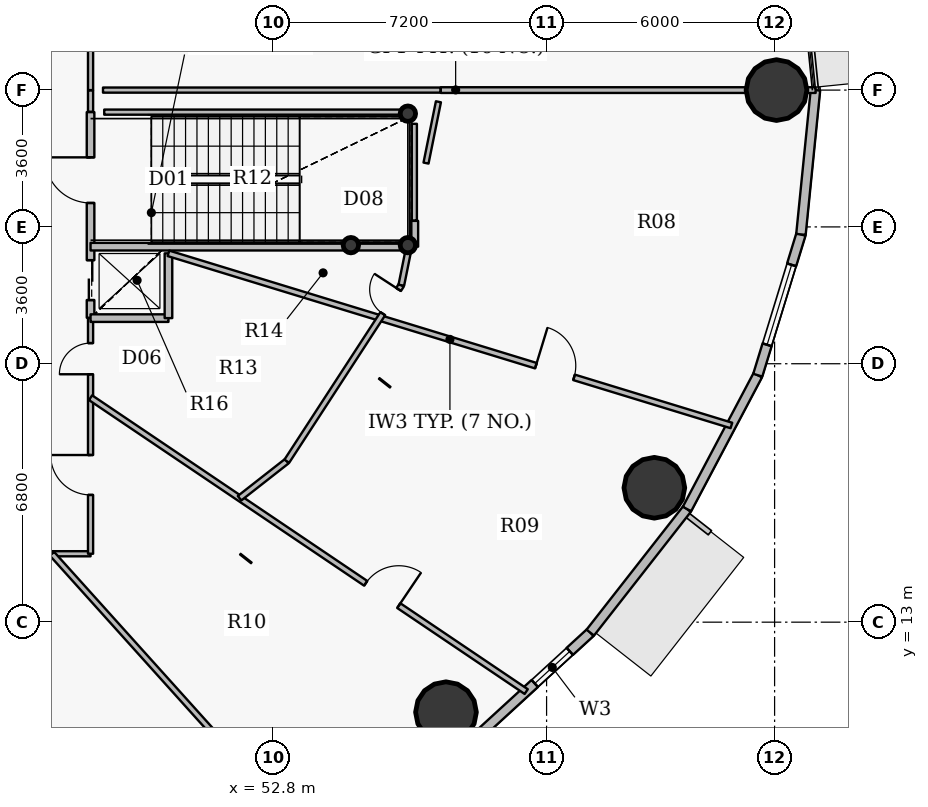
"""IFC4 building model, lengths in metres.
Left out: names, types, materials, properties, quantities, classifications, styles, units other than length and angle.
Written with IfcOpenShell. Run it as: python <this file> out.ifc"""

import sys

from ifc_helpers import new_model, si_unit, direction, frame, frame_2d, origin, origin_2d, place, context, subcontext, project, spatial, rectangle, hollow_circle, extrude, source, transform, mapped, element, fill, save


model = new_model("IFC4")
c1 = context("Model", 3, precision=1e-05, world=origin(), true_north=direction((0.0, 1.0)))
c2 = subcontext(c1, "Body", "Model", "MODEL_VIEW")
j1 = project(units=[si_unit("LENGTHUNIT", "METRE"), si_unit("PLANEANGLEUNIT", "RADIAN")], contexts=[c1])
p1 = place(None, origin())
s1 = spatial("IfcSite", under=j1, at=p1, CompositionType="ELEMENT")
p2 = place(p1, origin())
s2 = spatial("IfcBuilding", under=s1, at=p2, CompositionType="ELEMENT")
p3 = place(p2, frame((0.0, 0.0, 49.2)))
s3 = spatial("IfcBuildingStorey", under=s2, at=p3, CompositionType="ELEMENT", Elevation=49.2)
for number, where, z_axis, x_axis in (
    (1, (56.35, 26.38, 0.0), (0.0, 0.0, 1.0), (1.0, 0.0, 0.0)),
    (2, (56.35, 22.92, 0.0), (0.0, 0.0, 1.0), (1.0, 0.0, 0.0)),
    (3, (54.85, 22.92, 0.0), (0.0, 0.0, 1.0), (1.0, 0.0, 0.0)),
):
    element("IfcColumn", number, at=place(p3, frame(where, z_axis=z_axis, x_axis=x_axis)), inside=s3, PredefinedType="COLUMN", context=c2, shape_type="SweptSolid", body=[
        extrude(hollow_circle(Radius=0.203, WallThickness=0.016, at=origin_2d()), origin(), (0.0, 0.0, 1.0), 4.2),
    ])
for number, where, z_axis, x_axis in (
    (4, (66.05, 27.0, 0.0), (0.0, 0.0, 1.0), (1.0, 0.0, 0.0)),
    (5, (57.353, 10.631, 0.0), (0.0, 0.0, 1.0), (1.0, 0.0, 0.0)),
    (6, (62.835, 16.536, 0.0), (0.0, 0.0, 1.0), (1.0, 0.0, 0.0)),
):
    element("IfcColumn", number, at=place(p3, frame(where, z_axis=z_axis, x_axis=x_axis)), inside=s3, PredefinedType="COLUMN", context=c2, shape_type="SweptSolid", body=[
        extrude(hollow_circle(Radius=0.8, WallThickness=0.045, at=origin_2d()), origin(), (0.0, 0.0, 1.0), 4.2),
    ])
p4 = place(p3, frame((61.15, 12.725, 0.0), z_axis=(0.0, 0.0, 1.0), x_axis=(-0.737116376281, -0.67576582321, 0.0)))
e7 = element("IfcWall", 7, at=p4, inside=s3, PredefinedType="SOLIDWALL", context=c2, shape_type="SweptSolid", body=[
    extrude(rectangle(XDim=4.294, YDim=0.25, at=frame_2d((2.147, 0.0))), origin(), (0.0, 0.0, 1.0), 3.95),
])
p5 = place(p4, frame((0.731, 0.0, 0.9)))
e8 = element("IfcOpeningElement", 8, at=p5, cuts=e7, PredefinedType="OPENING", context=c2, shape_type="SweptSolid", body=[
    extrude(rectangle(XDim=1.25, YDim=1.65, at=origin_2d()), frame((0.625, 0.135, 0.825), z_axis=(0.0, -1.0, 0.0), x_axis=(1.0, 0.0, 0.0)), (0.0, 0.0, 1.0), 0.27),
])
p6 = place(p3, frame((63.695, 15.977, 0.0), z_axis=(0.0, 0.0, 1.0), x_axis=(-0.616295508253, -0.787514981767, 0.0)))
e9 = element("IfcWall", 9, at=p6, inside=s3, PredefinedType="SOLIDWALL", context=c2, shape_type="SweptSolid", body=[
    extrude(rectangle(XDim=4.129, YDim=0.25, at=frame_2d((2.065, 0.0))), origin(), (0.0, 0.0, 1.0), 3.95),
])
p7 = place(p3, frame((65.558, 19.499, 0.0), z_axis=(0.0, 0.0, 1.0), x_axis=(-0.467662443071, -0.883907144072, 0.0)))
e10 = element("IfcWall", 10, at=p7, inside=s3, PredefinedType="SOLIDWALL", context=c2, shape_type="SweptSolid", body=[
    extrude(rectangle(XDim=3.984, YDim=0.25, at=frame_2d((1.992, 0.0))), origin(), (0.0, 0.0, 1.0), 3.95),
])
p8 = place(p3, frame((66.693, 23.203, 0.0), z_axis=(0.0, 0.0, 1.0), x_axis=(-0.293111631758, -0.956078224482, 0.0)))
e11 = element("IfcWall", 11, at=p8, inside=s3, PredefinedType="SOLIDWALL", context=c2, shape_type="SweptSolid", body=[
    extrude(rectangle(XDim=3.875, YDim=0.25, at=frame_2d((1.938, 0.0))), origin(), (0.0, 0.0, 1.0), 3.95),
])
p9 = place(p8, frame((0.837, 0.0, 0.9)))
e12 = element("IfcOpeningElement", 12, at=p9, cuts=e11, PredefinedType="OPENING", context=c2, shape_type="SweptSolid", body=[
    extrude(rectangle(XDim=2.2, YDim=2.0, at=origin_2d()), frame((1.1, 0.135, 1.0), z_axis=(0.0, -1.0, 0.0), x_axis=(1.0, 0.0, 0.0)), (0.0, 0.0, 1.0), 0.27),
])
p10 = place(p3, frame((67.075, 27.0, 0.0), z_axis=(0.0, 0.0, 1.0), x_axis=(-0.099997795174, -0.994987658698, 0.0)))
e13 = element("IfcWall", 13, at=p10, inside=s3, PredefinedType="SOLIDWALL", context=c2, shape_type="SweptSolid", body=[
    extrude(rectangle(XDim=3.816, YDim=0.25, at=frame_2d((1.908, 0.0))), origin(), (0.0, 0.0, 1.0), 3.95),
])
p11 = place(p3, frame((46.05, 14.8, 0.0), z_axis=(0.0, 0.0, 1.0), x_axis=(1.0, 0.0, 0.0)))
e14 = element("IfcWall", 14, at=p11, inside=s3, PredefinedType="PARTITIONING", context=c2, shape_type="SweptSolid", body=[
    extrude(rectangle(XDim=1.95, YDim=0.135, at=frame_2d((0.975, 0.0))), origin(), (0.0, 0.0, 1.0), 3.95),
])
p12 = place(p3, frame((46.985, 14.8, 0.0), z_axis=(0.0, 0.0, 1.0), x_axis=(0.669133664768, -0.743142071662, 0.0)))
e15 = element("IfcWall", 15, at=p12, inside=s3, PredefinedType="PARTITIONING", context=c2, shape_type="SweptSolid", body=[
    extrude(rectangle(XDim=10.299, YDim=0.15, at=frame_2d((5.149, 0.0))), origin(), (0.0, 0.0, 1.0), 3.335),
])
p13 = place(p3, frame((48.0, 14.8, 0.0), z_axis=(0.0, 0.0, 1.0), x_axis=(0.0, 1.0, 0.0)))
e16 = element("IfcWall", 16, at=p13, inside=s3, PredefinedType="PARTITIONING", context=c2, shape_type="SweptSolid", body=[
    extrude(rectangle(XDim=6.2, YDim=0.135, at=frame_2d((3.1, 0.0))), origin(), (0.0, 0.0, 1.0), 3.285),
])
p14 = place(p13, frame((1.548, 0.0, 0.0)))
e17 = element("IfcOpeningElement", 17, at=p14, cuts=e16, PredefinedType="OPENING", context=c2, shape_type="SweptSolid", body=[
    extrude(rectangle(XDim=1.05, YDim=2.15, at=origin_2d()), frame((0.525, 0.078, 1.075), z_axis=(0.0, -1.0, 0.0), x_axis=(1.0, 0.0, 0.0)), (0.0, 0.0, 1.0), 0.155),
])
p15 = place(p13, frame((4.723, 0.0, 0.0)))
e18 = element("IfcOpeningElement", 18, at=p15, cuts=e16, PredefinedType="OPENING", context=c2, shape_type="SweptSolid", body=[
    extrude(rectangle(XDim=0.82, YDim=2.1, at=origin_2d()), frame((0.41, 0.078, 1.05), z_axis=(0.0, -1.0, 0.0), x_axis=(1.0, 0.0, 0.0)), (0.0, 0.0, 1.0), 0.155),
])
p16 = place(p3, frame((48.0, 18.906, 0.0), z_axis=(0.0, 0.0, 1.0), x_axis=(0.829036724814, -0.559194160296, 0.0)))
e19 = element("IfcWall", 19, at=p16, inside=s3, PredefinedType="PARTITIONING", context=c2, shape_type="SweptSolid", body=[
    extrude(rectangle(XDim=13.828, YDim=0.15, at=frame_2d((6.914, 0.0))), origin(), (0.0, 0.0, 1.0), 3.335),
])
p17 = place(p16, frame((8.733, 0.0, 0.0)))
e20 = element("IfcOpeningElement", 20, at=p17, cuts=e19, PredefinedType="OPENING", context=c2, shape_type="SweptSolid", body=[
    extrude(rectangle(XDim=1.05, YDim=2.15, at=origin_2d()), frame((0.525, 0.085, 1.075), z_axis=(0.0, -1.0, 0.0), x_axis=(1.0, 0.0, 0.0)), (0.0, 0.0, 1.0), 0.17),
])
p18 = place(p3, frame((48.0, 21.01, 0.0), z_axis=(0.0, 0.0, 1.0), x_axis=(0.0, 1.0, 0.0)))
e21 = element("IfcWall", 21, at=p18, inside=s3, PredefinedType="PARTITIONING", context=c2, shape_type="SweptSolid", body=[
    extrude(rectangle(XDim=5.41, YDim=0.2, at=frame_2d((2.705, 0.0))), origin(), (0.0, 0.0, 1.0), 3.285),
])
p19 = place(p18, frame((3.02, 0.0, 0.0)))
e22 = element("IfcOpeningElement", 22, at=p19, cuts=e21, PredefinedType="OPENING", context=c2, shape_type="SweptSolid", body=[
    extrude(rectangle(XDim=1.2, YDim=2.15, at=origin_2d()), frame((0.6, 0.11, 1.075), z_axis=(0.0, -1.0, 0.0), x_axis=(1.0, 0.0, 0.0)), (0.0, 0.0, 1.0), 0.22),
])
p20 = place(p18, frame((0.465, 0.0, 0.0)))
e23 = element("IfcOpeningElement", 23, at=p20, cuts=e21, PredefinedType="OPENING", context=c2, shape_type="SweptSolid", body=[
    extrude(rectangle(XDim=1.05, YDim=2.15, at=origin_2d()), frame((0.525, 0.11, 1.075), z_axis=(0.0, -1.0, 0.0), x_axis=(1.0, 0.0, 0.0)), (0.0, 0.0, 1.0), 0.22),
])
p21 = place(p3, frame((48.0, 21.0, 0.0), z_axis=(0.0, 0.0, 1.0), x_axis=(1.0, 0.0, 0.0)))
e24 = element("IfcWall", 24, at=p21, inside=s3, PredefinedType="PARTITIONING", context=c2, shape_type="SweptSolid", body=[
    extrude(rectangle(XDim=2.05, YDim=0.2, at=frame_2d((1.025, 0.0))), origin(), (0.0, 0.0, 1.0), 3.95),
])
p22 = place(p3, frame((48.0, 22.88, 0.0), z_axis=(0.0, 0.0, 1.0), x_axis=(1.0, 0.0, 0.0)))
e25 = element("IfcWall", 25, at=p22, inside=s3, PredefinedType="PARTITIONING", context=c2, shape_type="SweptSolid", body=[
    extrude(rectangle(XDim=8.383, YDim=0.2, at=frame_2d((4.191, 0.0))), origin(), (0.0, 0.0, 1.0), 3.95),
])
p23 = place(p3, frame((48.0, 27.0, 0.0), z_axis=(0.0, 0.0, 1.0), x_axis=(0.0, 1.0, 0.0)))
e26 = element("IfcWall", 26, at=p23, inside=s3, PredefinedType="PARTITIONING", context=c2, shape_type="SweptSolid", body=[
    extrude(rectangle(XDim=14.2, YDim=0.135, at=frame_2d((7.1, 0.0))), origin(), (0.0, 0.0, 1.0), 3.285),
])
p24 = place(p23, frame((2.959, 0.0, 0.0)))
e27 = element("IfcOpeningElement", 27, at=p24, cuts=e26, PredefinedType="OPENING", context=c2, shape_type="SweptSolid", body=[
    extrude(rectangle(XDim=1.05, YDim=2.15, at=origin_2d()), frame((0.525, 0.078, 1.075), z_axis=(0.0, -1.0, 0.0), x_axis=(1.0, 0.0, 0.0)), (0.0, 0.0, 1.0), 0.155),
])
p25 = place(p23, frame((10.019, 0.0, 0.0)))
e28 = element("IfcOpeningElement", 28, at=p25, cuts=e26, PredefinedType="OPENING", context=c2, shape_type="SweptSolid", body=[
    extrude(rectangle(XDim=1.05, YDim=2.15, at=origin_2d()), frame((0.525, 0.078, 1.075), z_axis=(0.0, -1.0, 0.0), x_axis=(1.0, 0.0, 0.0)), (0.0, 0.0, 1.0), 0.155),
])
p26 = place(p3, frame((50.05, 21.0, 0.0), z_axis=(0.0, 0.0, 1.0), x_axis=(0.0, 1.0, 0.0)))
e29 = element("IfcWall", 29, at=p26, inside=s3, PredefinedType="PARTITIONING", context=c2, shape_type="SweptSolid", body=[
    extrude(rectangle(XDim=1.705, YDim=0.2, at=frame_2d((0.852, 0.0))), origin(), (0.0, 0.0, 1.0), 3.285),
])
p27 = place(p3, frame((50.05, 22.705, 0.0), z_axis=(0.0, 0.0, 1.0), x_axis=(0.9563012706, -0.292383104588, 0.0)))
e30 = element("IfcWall", 30, at=p27, inside=s3, PredefinedType="PARTITIONING", context=c2, shape_type="SweptSolid", body=[
    extrude(rectangle(XDim=15.49, YDim=0.15, at=frame_2d((7.745, 0.0))), origin(), (0.0, 0.0, 1.0), 3.335),
])
p28 = place(p27, frame((10.11, 0.0, 0.0)))
e31 = element("IfcOpeningElement", 31, at=p28, cuts=e30, PredefinedType="OPENING", context=c2, shape_type="SweptSolid", body=[
    extrude(rectangle(XDim=1.05, YDim=2.15, at=origin_2d()), frame((0.525, 0.085, 1.075), z_axis=(0.0, -1.0, 0.0), x_axis=(1.0, 0.0, 0.0)), (0.0, 0.0, 1.0), 0.17),
])
p29 = place(p3, frame((51.92, 16.262, 0.0), z_axis=(0.0, 0.0, 1.0), x_axis=(0.787325584525, 0.616537447324, 0.0)))
e32 = element("IfcWall", 32, at=p29, inside=s3, PredefinedType="PARTITIONING", context=c2, shape_type="SweptSolid", body=[
    extrude(rectangle(XDim=1.58, YDim=0.15, at=frame_2d((0.79, 0.0))), origin(), (0.0, 0.0, 1.0), 3.95),
])
p30 = place(p3, frame((53.164, 17.236, 0.0), z_axis=(0.0, 0.0, 1.0), x_axis=(0.545448002944, 0.838144662981, 0.0)))
e33 = element("IfcWall", 33, at=p30, inside=s3, PredefinedType="PARTITIONING", context=c2, shape_type="SweptSolid", body=[
    extrude(rectangle(XDim=5.525, YDim=0.15, at=frame_2d((2.763, 0.0))), origin(), (0.0, 0.0, 1.0), 3.285),
])
p31 = place(p30, frame((4.631, 0.0, 0.0)))
e34 = element("IfcOpeningElement", 34, at=p31, cuts=e33, PredefinedType="OPENING", context=c2, shape_type="SweptSolid", body=[
    extrude(rectangle(XDim=0.76, YDim=2.1, at=origin_2d()), frame((0.38, 0.085, 1.05), z_axis=(0.0, -1.0, 0.0), x_axis=(1.0, 0.0, 0.0)), (0.0, 0.0, 1.0), 0.17),
])
p32 = place(p3, frame((56.178, 21.866, 0.0), z_axis=(0.0, 0.0, 1.0), x_axis=(0.198113758035, 0.980179034094, 0.0)))
e35 = element("IfcWall", 35, at=p32, inside=s3, PredefinedType="PARTITIONING", context=c2, shape_type="SweptSolid", body=[
    extrude(rectangle(XDim=1.034, YDim=0.15, at=frame_2d((0.517, 0.0))), origin(), (0.0, 0.0, 1.0), 3.95),
])
p33 = place(p3, frame((56.52, 22.88, 0.0), z_axis=(0.0, 0.0, 1.0), x_axis=(0.0, 1.0, 0.0)))
e36 = element("IfcWall", 36, at=p33, inside=s3, PredefinedType="PARTITIONING", context=c2, shape_type="SweptSolid", body=[
    extrude(rectangle(XDim=0.679, YDim=0.2, at=frame_2d((0.34, 0.0))), origin(), (0.0, 0.0, 1.0), 3.95),
])
p34 = place(p3, frame((57.216, 27.0, 0.0), z_axis=(0.0, 0.0, 1.0), x_axis=(1.0, 0.0, 0.0)))
e37 = element("IfcWall", 37, at=p34, inside=s3, PredefinedType="PARTITIONING", context=c2, shape_type="SweptSolid", body=[
    extrude(rectangle(XDim=9.864, YDim=0.15, at=frame_2d((4.932, 0.0))), origin(), (0.0, 0.0, 1.0), 3.285),
])
p35 = place(p3, frame((48.36, 26.42, 0.0), z_axis=(0.0, 0.0, 1.0), x_axis=(1.0, 0.0, 0.0)))
e38 = element("IfcWall", 38, at=p35, inside=s3, PredefinedType="PARTITIONING", context=c2, shape_type="SweptSolid", body=[
    extrude(rectangle(XDim=8.16, YDim=0.135, at=frame_2d((4.08, 0.0))), origin(), (0.0, 0.0, 1.0), 3.95),
])
p36 = place(p3, frame((56.52, 26.113, 0.0), z_axis=(0.0, 0.0, 1.0), x_axis=(0.0, -1.0, 0.0)))
e39 = element("IfcWall", 39, at=p36, inside=s3, PredefinedType="PARTITIONING", context=c2, shape_type="SweptSolid", body=[
    extrude(rectangle(XDim=2.543, YDim=0.135, at=frame_2d((1.272, 0.0))), origin(), (0.0, 0.0, 1.0), 3.95),
])
p37 = place(p3, frame((48.0, 26.99, 0.0), z_axis=(0.0, 0.0, 1.0), x_axis=(0.0, -1.0, 0.0)))
e40 = element("IfcWall", 40, at=p37, inside=s3, PredefinedType="PARTITIONING", context=c2, shape_type="SweptSolid", body=[
    extrude(rectangle(XDim=0.56, YDim=0.135, at=frame_2d((0.28, 0.0))), origin(), (0.0, 0.0, 1.0), 3.285),
])
p38 = place(p3, frame((57.206, 27.0, 0.0), z_axis=(0.0, 0.0, 1.0), x_axis=(-1.0, 0.0, 0.0)))
e41 = element("IfcWall", 41, at=p38, inside=s3, PredefinedType="PARTITIONING", context=c2, shape_type="SweptSolid", body=[
    extrude(rectangle(XDim=8.879, YDim=0.135, at=frame_2d((4.439, 0.0))), origin(), (0.0, 0.0, 1.0), 3.285),
])
p39 = place(p3, frame((56.827, 25.079, 0.0), z_axis=(0.0, 0.0, 1.0), x_axis=(0.198340845342, 0.980133107832, 0.0)))
e42 = element("IfcWall", 42, at=p39, inside=s3, PredefinedType="PARTITIONING", context=c2, shape_type="SweptSolid", body=[
    extrude(rectangle(XDim=1.646, YDim=0.135, at=frame_2d((0.823, 0.0))), origin(), (0.0, 0.0, 1.0), 3.95),
])
m1 = source(origin(), c2, "Body", "SweptSolid", [
    extrude(rectangle(XDim=1.25, YDim=1.65, at=origin_2d()), frame((0.625, 0.03, 0.825), z_axis=(0.0, -1.0, 0.0), x_axis=(1.0, 0.0, 0.0)), (0.0, 0.0, 1.0), 0.06),
])
p40 = place(p5, origin())
e43 = element("IfcWindow", 43, at=p40, inside=s3, PartitioningType="SINGLE_PANEL", PredefinedType="WINDOW", context=c2, shape_type="MappedRepresentation", body=[
    mapped(m1, transform((0.0, 0.0, 0.0), x_axis=(1.0, 0.0, 0.0), y_axis=(0.0, 1.0, 0.0), z_axis=(0.0, 0.0, 1.0), scale=1.0)),
])
fill(e8, e43)
m2 = source(origin(), c2, "Body", "SweptSolid", [
    extrude(rectangle(XDim=2.2, YDim=2.0, at=origin_2d()), frame((1.1, 0.03, 1.0), z_axis=(0.0, -1.0, 0.0), x_axis=(1.0, 0.0, 0.0)), (0.0, 0.0, 1.0), 0.06),
])
p41 = place(p9, origin())
e44 = element("IfcWindow", 44, at=p41, inside=s3, PartitioningType="TRIPLE_PANEL_VERTICAL", PredefinedType="WINDOW", context=c2, shape_type="MappedRepresentation", body=[
    mapped(m2, transform((0.0, 0.0, 0.0), x_axis=(1.0, 0.0, 0.0), y_axis=(0.0, 1.0, 0.0), z_axis=(0.0, 0.0, 1.0), scale=1.0)),
])
fill(e12, e44)
m3 = source(origin(), c2, "Body", "SweptSolid", [
    extrude(rectangle(XDim=1.2, YDim=2.15, at=origin_2d()), frame((0.6, 0.025, 1.075), z_axis=(0.0, -1.0, 0.0), x_axis=(1.0, 0.0, 0.0)), (0.0, 0.0, 1.0), 0.05),
])
p42 = place(p19, origin())
e45 = element("IfcDoor", 45, at=p42, inside=s3, OperationType="SINGLE_SWING_RIGHT", PredefinedType="DOOR", context=c2, shape_type="MappedRepresentation", body=[
    mapped(m3, transform((0.0, 0.0, 0.0), x_axis=(1.0, 0.0, 0.0), y_axis=(0.0, 1.0, 0.0), z_axis=(0.0, 0.0, 1.0), scale=1.0)),
])
fill(e22, e45)
m4 = source(origin(), c2, "Body", "SweptSolid", [
    extrude(rectangle(XDim=1.05, YDim=2.15, at=origin_2d()), frame((0.525, 0.025, 1.075), z_axis=(0.0, -1.0, 0.0), x_axis=(1.0, 0.0, 0.0)), (0.0, 0.0, 1.0), 0.05),
])
p43 = place(p20, origin())
e46 = element("IfcDoor", 46, at=p43, inside=s3, OperationType="DOUBLE_DOOR_SLIDING", PredefinedType="USERDEFINED", context=c2, shape_type="MappedRepresentation", body=[
    mapped(m4, transform((0.0, 0.0, 0.0), x_axis=(1.0, 0.0, 0.0), y_axis=(0.0, 1.0, 0.0), z_axis=(0.0, 0.0, 1.0), scale=1.0)),
])
fill(e23, e46)
m5 = source(origin(), c2, "Body", "SweptSolid", [
    extrude(rectangle(XDim=1.05, YDim=2.15, at=origin_2d()), frame((0.525, 0.025, 1.075), z_axis=(0.0, -1.0, 0.0), x_axis=(1.0, 0.0, 0.0)), (0.0, 0.0, 1.0), 0.05),
])
p44 = place(p14, origin())
e47 = element("IfcDoor", 47, at=p44, inside=s3, OperationType="SINGLE_SWING_RIGHT", PredefinedType="DOOR", context=c2, shape_type="MappedRepresentation", body=[
    mapped(m5, transform((0.0, 0.0, 0.0), x_axis=(1.0, 0.0, 0.0), y_axis=(0.0, 1.0, 0.0), z_axis=(0.0, 0.0, 1.0), scale=1.0)),
])
fill(e17, e47)
m6 = source(origin(), c2, "Body", "SweptSolid", [
    extrude(rectangle(XDim=0.82, YDim=2.1, at=origin_2d()), frame((0.41, 0.025, 1.05), z_axis=(0.0, -1.0, 0.0), x_axis=(1.0, 0.0, 0.0)), (0.0, 0.0, 1.0), 0.05),
])
p45 = place(p15, origin())
e48 = element("IfcDoor", 48, at=p45, inside=s3, OperationType="SINGLE_SWING_LEFT", PredefinedType="DOOR", context=c2, shape_type="MappedRepresentation", body=[
    mapped(m6, transform((0.0, 0.0, 0.0), x_axis=(1.0, 0.0, 0.0), y_axis=(0.0, 1.0, 0.0), z_axis=(0.0, 0.0, 1.0), scale=1.0)),
])
fill(e18, e48)
p46 = place(p17, origin())
e49 = element("IfcDoor", 49, at=p46, inside=s3, OperationType="SINGLE_SWING_RIGHT", PredefinedType="DOOR", context=c2, shape_type="MappedRepresentation", body=[
    mapped(m5, transform((0.0, 0.0, 0.0), x_axis=(1.0, 0.0, 0.0), y_axis=(0.0, 1.0, 0.0), z_axis=(0.0, 0.0, 1.0), scale=1.0)),
])
fill(e20, e49)
p47 = place(p28, origin())
e50 = element("IfcDoor", 50, at=p47, inside=s3, OperationType="SINGLE_SWING_LEFT", PredefinedType="DOOR", context=c2, shape_type="MappedRepresentation", body=[
    mapped(m5, transform((0.0, 0.0, 0.0), x_axis=(1.0, 0.0, 0.0), y_axis=(0.0, 1.0, 0.0), z_axis=(0.0, 0.0, 1.0), scale=1.0)),
])
fill(e31, e50)
m7 = source(origin(), c2, "Body", "SweptSolid", [
    extrude(rectangle(XDim=0.76, YDim=2.1, at=origin_2d()), frame((0.38, 0.025, 1.05), z_axis=(0.0, -1.0, 0.0), x_axis=(1.0, 0.0, 0.0)), (0.0, 0.0, 1.0), 0.05),
])
p48 = place(p31, origin())
e51 = element("IfcDoor", 51, at=p48, inside=s3, OperationType="SINGLE_SWING_RIGHT", PredefinedType="DOOR", context=c2, shape_type="MappedRepresentation", body=[
    mapped(m7, transform((0.0, 0.0, 0.0), x_axis=(1.0, 0.0, 0.0), y_axis=(0.0, 1.0, 0.0), z_axis=(0.0, 0.0, 1.0), scale=1.0)),
])
fill(e34, e51)
save(model, sys.argv[1])
